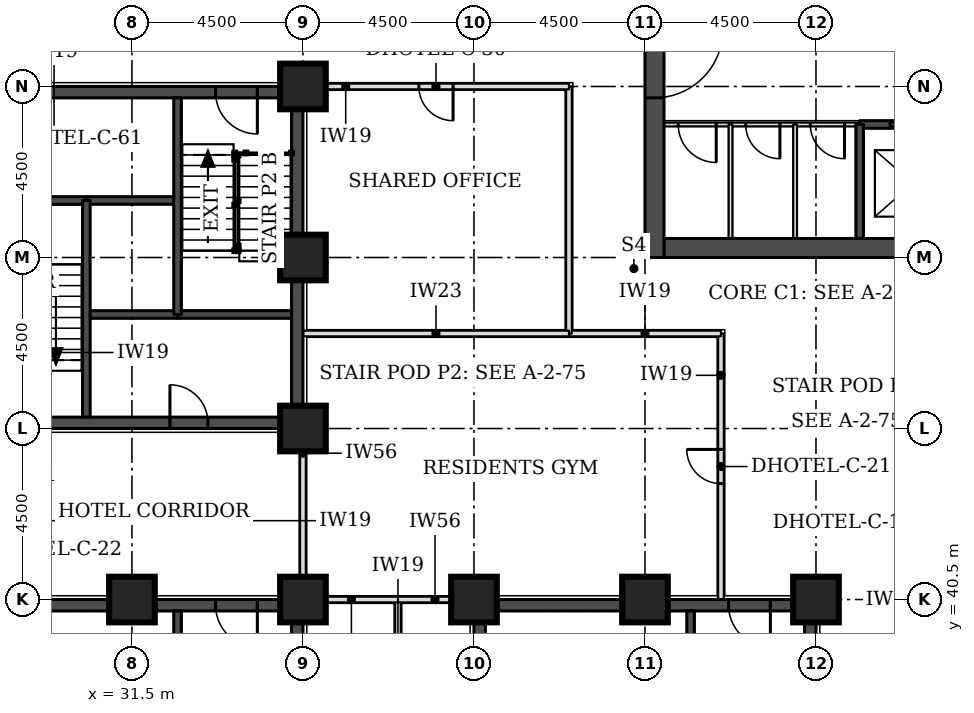
"""IFC4 building model, lengths in metres.
Left out: names, types, materials, properties, quantities, classifications, styles, units other than length and angle.
Written with IfcOpenShell. Run it as: python <this file> out.ifc"""

import sys

from ifc_helpers import new_model, si_unit, direction, frame, frame_2d, origin, origin_2d, place, context, subcontext, project, spatial, rectangle, extrude, element, fill, save


model = new_model("IFC4")
c1 = context("Model", 3, precision=1e-05, world=origin(), true_north=direction((0.0, 1.0)))
c2 = subcontext(c1, "Body", "Model", "MODEL_VIEW")
j1 = project(units=[si_unit("LENGTHUNIT", "METRE"), si_unit("PLANEANGLEUNIT", "RADIAN")], contexts=[c1])
p1 = place(None, origin())
s1 = spatial("IfcSite", under=j1, at=p1, CompositionType="ELEMENT")
p2 = place(p1, origin())
s2 = spatial("IfcBuilding", under=s1, at=p2, CompositionType="ELEMENT")
p3 = place(p2, frame((0.0, 0.0, 33.0)))
s3 = spatial("IfcBuildingStorey", under=s2, at=p3, CompositionType="ELEMENT", Elevation=33.0)
for number, where, z_axis, x_axis in (
    (1, (31.5, 40.5, 0.0), (0.0, 0.0, 1.0), (1.0, 0.0, 0.0)),
    (2, (36.0, 40.5, 0.0), (0.0, 0.0, 1.0), (1.0, 0.0, 0.0)),
    (3, (40.5, 40.5, 0.0), (0.0, 0.0, 1.0), (1.0, 0.0, 0.0)),
    (4, (45.0, 40.5, 0.0), (0.0, 0.0, 1.0), (1.0, 0.0, 0.0)),
    (5, (49.5, 40.5, 0.0), (0.0, 0.0, 1.0), (1.0, 0.0, 0.0)),
    (6, (36.0, 45.0, 0.0), (0.0, 0.0, 1.0), (1.0, 0.0, 0.0)),
    (7, (36.0, 49.5, 0.0), (0.0, 0.0, 1.0), (1.0, 0.0, 0.0)),
    (8, (36.0, 54.0, 0.0), (0.0, 0.0, 1.0), (1.0, 0.0, 0.0)),
):
    element("IfcColumn", number, at=place(p3, frame(where, z_axis=z_axis, x_axis=x_axis)), inside=s3, PredefinedType="COLUMN", context=c2, shape_type="SweptSolid", body=[
        extrude(rectangle(XDim=1.2, YDim=1.2, at=origin_2d()), origin(), (0.0, 0.0, 1.0), 3.3),
    ])
p4 = place(p3, frame((45.5, 49.75, 0.0), z_axis=(0.0, 0.0, 1.0), x_axis=(1.0, 0.0, 0.0)))
e9 = element("IfcWall", 9, at=p4, inside=s3, PredefinedType="SHEAR", context=c2, shape_type="SweptSolid", body=[
    extrude(rectangle(XDim=21.5, YDim=0.5, at=frame_2d((10.75, 0.0))), origin(), (0.0, 0.0, 1.0), 3.3),
])
p5 = place(p3, frame((45.25, 49.5, 0.0), z_axis=(0.0, 0.0, 1.0), x_axis=(0.0, 1.0, 0.0)))
e10 = element("IfcWall", 10, at=p5, inside=s3, PredefinedType="SHEAR", context=c2, shape_type="SweptSolid", body=[
    extrude(rectangle(XDim=22.5, YDim=0.5, at=frame_2d((11.25, 0.0))), origin(), (0.0, 0.0, 1.0), 3.3),
])
p6 = place(p5, frame((4.2, 0.0, 0.0)))
e11 = element("IfcOpeningElement", 11, at=p6, cuts=e10, PredefinedType="OPENING", context=c2, shape_type="SweptSolid", body=[
    extrude(rectangle(XDim=1.8, YDim=2.1, at=frame_2d((0.9, 1.05))), frame((0.0, 0.26, 0.0), z_axis=(0.0, -1.0, 0.0), x_axis=(1.0, 0.0, 0.0)), (0.0, 0.0, 1.0), 0.52),
])
p7 = place(p5, frame((6.9, 0.0, 0.0)))
e12 = element("IfcOpeningElement", 12, at=p7, cuts=e10, PredefinedType="OPENING", context=c2, shape_type="SweptSolid", body=[
    extrude(rectangle(XDim=1.1, YDim=2.1, at=frame_2d((0.55, 1.05))), frame((0.0, 0.26, 0.0), z_axis=(0.0, -1.0, 0.0), x_axis=(1.0, 0.0, 0.0)), (0.0, 0.0, 1.0), 0.52),
])
p8 = place(p5, frame((13.6, 0.0, 0.0)))
e13 = element("IfcOpeningElement", 13, at=p8, cuts=e10, PredefinedType="OPENING", context=c2, shape_type="SweptSolid", body=[
    extrude(rectangle(XDim=1.1, YDim=2.1, at=frame_2d((0.55, 1.05))), frame((0.0, 0.26, 0.0), z_axis=(0.0, -1.0, 0.0), x_axis=(1.0, 0.0, 0.0)), (0.0, 0.0, 1.0), 0.52),
])
p9 = place(p5, frame((16.5, 0.0, 0.0)))
e14 = element("IfcOpeningElement", 14, at=p9, cuts=e10, PredefinedType="OPENING", context=c2, shape_type="SweptSolid", body=[
    extrude(rectangle(XDim=1.8, YDim=2.1, at=frame_2d((0.9, 1.05))), frame((0.0, 0.26, 0.0), z_axis=(0.0, -1.0, 0.0), x_axis=(1.0, 0.0, 0.0)), (0.0, 0.0, 1.0), 0.52),
])
p10 = place(p3, frame((27.3, 45.15, 0.0), z_axis=(0.0, 0.0, 1.0), x_axis=(1.0, 0.0, 0.0)))
e15 = element("IfcWall", 15, at=p10, inside=s3, PredefinedType="SHEAR", context=c2, shape_type="SweptSolid", body=[
    extrude(rectangle(XDim=8.4, YDim=0.3, at=frame_2d((4.2, 0.0))), origin(), (0.0, 0.0, 1.0), 3.3),
])
p11 = place(p10, frame((5.2, 0.0, 0.0)))
e16 = element("IfcOpeningElement", 16, at=p11, cuts=e15, PredefinedType="OPENING", context=c2, shape_type="SweptSolid", body=[
    extrude(rectangle(XDim=1.0, YDim=2.1, at=frame_2d((0.5, 1.05))), frame((0.0, 0.16, 0.0), z_axis=(0.0, -1.0, 0.0), x_axis=(1.0, 0.0, 0.0)), (0.0, 0.0, 1.0), 0.32),
])
p12 = place(p3, frame((27.3, 53.85, 0.0), z_axis=(0.0, 0.0, 1.0), x_axis=(1.0, 0.0, 0.0)))
e17 = element("IfcWall", 17, at=p12, inside=s3, PredefinedType="SHEAR", context=c2, shape_type="SweptSolid", body=[
    extrude(rectangle(XDim=8.4, YDim=0.3, at=frame_2d((4.2, 0.0))), origin(), (0.0, 0.0, 1.0), 3.3),
])
p13 = place(p12, frame((6.4, 0.0, 0.0)))
e18 = element("IfcOpeningElement", 18, at=p13, cuts=e17, PredefinedType="OPENING", context=c2, shape_type="SweptSolid", body=[
    extrude(rectangle(XDim=1.1, YDim=2.1, at=frame_2d((0.55, 1.05))), frame((0.0, 0.16, 0.0), z_axis=(0.0, -1.0, 0.0), x_axis=(1.0, 0.0, 0.0)), (0.0, 0.0, 1.0), 0.32),
])
p14 = place(p3, frame((35.85, 45.0, 0.0), z_axis=(0.0, 0.0, 1.0), x_axis=(0.0, 1.0, 0.0)))
e19 = element("IfcWall", 19, at=p14, inside=s3, PredefinedType="SHEAR", context=c2, shape_type="SweptSolid", body=[
    extrude(rectangle(XDim=9.0, YDim=0.3, at=frame_2d((4.5, 0.0))), origin(), (0.0, 0.0, 1.0), 3.3),
])
p15 = place(p3, frame((40.8, 40.35, 0.0), z_axis=(0.0, 0.0, 1.0), x_axis=(1.0, 0.0, 0.0)))
e20 = element("IfcWall", 20, at=p15, inside=s3, PredefinedType="SHEAR", context=c2, shape_type="SweptSolid", body=[
    extrude(rectangle(XDim=8.4, YDim=0.3, at=frame_2d((4.2, 0.0))), origin(), (0.0, 0.0, 1.0), 3.3),
])
p16 = place(p15, frame((6.4, 0.0, 0.0)))
e21 = element("IfcOpeningElement", 21, at=p16, cuts=e20, PredefinedType="OPENING", context=c2, shape_type="SweptSolid", body=[
    extrude(rectangle(XDim=1.1, YDim=2.1, at=frame_2d((0.55, 1.05))), frame((0.0, 0.16, 0.0), z_axis=(0.0, -1.0, 0.0), x_axis=(1.0, 0.0, 0.0)), (0.0, 0.0, 1.0), 0.32),
])
p17 = place(p3, frame((40.65, 31.5, 0.0), z_axis=(0.0, 0.0, 1.0), x_axis=(0.0, 1.0, 0.0)))
e22 = element("IfcWall", 22, at=p17, inside=s3, PredefinedType="SHEAR", context=c2, shape_type="SweptSolid", body=[
    extrude(rectangle(XDim=9.0, YDim=0.3, at=frame_2d((4.5, 0.0))), origin(), (0.0, 0.0, 1.0), 3.3),
])
p18 = place(p17, frame((0.4, 0.0, 0.0)))
e23 = element("IfcOpeningElement", 23, at=p18, cuts=e22, PredefinedType="OPENING", context=c2, shape_type="SweptSolid", body=[
    extrude(rectangle(XDim=1.1, YDim=2.1, at=frame_2d((0.55, 1.05))), frame((0.0, 0.16, 0.0), z_axis=(0.0, -1.0, 0.0), x_axis=(1.0, 0.0, 0.0)), (0.0, 0.0, 1.0), 0.32),
])
p19 = place(p3, frame((49.35, 31.5, 0.0), z_axis=(0.0, 0.0, 1.0), x_axis=(0.0, 1.0, 0.0)))
e24 = element("IfcWall", 24, at=p19, inside=s3, PredefinedType="SHEAR", context=c2, shape_type="SweptSolid", body=[
    extrude(rectangle(XDim=9.0, YDim=0.3, at=frame_2d((4.5, 0.0))), origin(), (0.0, 0.0, 1.0), 3.3),
])
p20 = place(p3, frame((27.3, 40.35, 0.0), z_axis=(0.0, 0.0, 1.0), x_axis=(1.0, 0.0, 0.0)))
e25 = element("IfcWall", 25, at=p20, inside=s3, PredefinedType="SHEAR", context=c2, shape_type="SweptSolid", body=[
    extrude(rectangle(XDim=8.4, YDim=0.3, at=frame_2d((4.2, 0.0))), origin(), (0.0, 0.0, 1.0), 3.3),
])
p21 = place(p20, frame((6.4, 0.0, 0.0)))
e26 = element("IfcOpeningElement", 26, at=p21, cuts=e25, PredefinedType="OPENING", context=c2, shape_type="SweptSolid", body=[
    extrude(rectangle(XDim=1.1, YDim=2.1, at=frame_2d((0.55, 1.05))), frame((0.0, 0.16, 0.0), z_axis=(0.0, -1.0, 0.0), x_axis=(1.0, 0.0, 0.0)), (0.0, 0.0, 1.0), 0.32),
])
p22 = place(p3, frame((35.85, 31.5, 0.0), z_axis=(0.0, 0.0, 1.0), x_axis=(0.0, 1.0, 0.0)))
e27 = element("IfcWall", 27, at=p22, inside=s3, PredefinedType="SHEAR", context=c2, shape_type="SweptSolid", body=[
    extrude(rectangle(XDim=9.0, YDim=0.3, at=frame_2d((4.5, 0.0))), origin(), (0.0, 0.0, 1.0), 3.3),
])
p23 = place(p3, frame((38.5, 27.15, 0.0), z_axis=(0.0, 0.0, 1.0), x_axis=(0.0, 1.0, 0.0)))
e28 = element("IfcWall", 28, at=p23, inside=s3, PredefinedType="PARTITIONING", context=c2, shape_type="SweptSolid", body=[
    extrude(rectangle(XDim=13.35, YDim=0.15, at=frame_2d((6.675, 0.0))), origin(), (0.0, 0.0, 1.0), 3.08),
])
p24 = place(p23, frame((6.225, 0.0, 0.0)))
e29 = element("IfcOpeningElement", 29, at=p24, cuts=e28, PredefinedType="OPENING", context=c2, shape_type="SweptSolid", body=[
    extrude(rectangle(XDim=0.9, YDim=2.1, at=frame_2d((0.45, 1.05))), frame((0.0, 0.085, 0.0), z_axis=(0.0, -1.0, 0.0), x_axis=(1.0, 0.0, 0.0)), (0.0, 0.0, 1.0), 0.17),
])
p25 = place(p3, frame((38.5, 40.5, 0.0), z_axis=(0.0, 0.0, 1.0), x_axis=(1.0, 0.0, 0.0)))
e30 = element("IfcWall", 30, at=p25, inside=s3, PredefinedType="PARTITIONING", context=c2, shape_type="SweptSolid", body=[
    extrude(rectangle(XDim=1.95, YDim=0.15, at=frame_2d((0.975, 0.0))), origin(), (0.0, 0.0, 1.0), 2.33),
])
p26 = place(p3, frame((36.0, 40.55, 0.0), z_axis=(0.0, 0.0, 1.0), x_axis=(0.0, 1.0, 0.0)))
e31 = element("IfcWall", 31, at=p26, inside=s3, PredefinedType="PARTITIONING", context=c2, shape_type="SweptSolid", body=[
    extrude(rectangle(XDim=4.4, YDim=0.15, at=frame_2d((2.2, 0.0))), origin(), (0.0, 0.0, 1.0), 2.33),
])
p27 = place(p3, frame((47.0, 40.5, 0.0), z_axis=(0.0, 0.0, 1.0), x_axis=(0.0, 1.0, 0.0)))
e32 = element("IfcWall", 32, at=p27, inside=s3, PredefinedType="PARTITIONING", context=c2, shape_type="SweptSolid", body=[
    extrude(rectangle(XDim=7.0, YDim=0.15, at=frame_2d((3.5, 0.0))), origin(), (0.0, 0.0, 1.0), 3.08),
])
p28 = place(p27, frame((3.05, 0.0, 0.0)))
e33 = element("IfcOpeningElement", 33, at=p28, cuts=e32, PredefinedType="OPENING", context=c2, shape_type="SweptSolid", body=[
    extrude(rectangle(XDim=0.9, YDim=2.1, at=frame_2d((0.45, 1.05))), frame((0.0, 0.085, 0.0), z_axis=(0.0, -1.0, 0.0), x_axis=(1.0, 0.0, 0.0)), (0.0, 0.0, 1.0), 0.17),
])
p29 = place(p3, frame((43.0, 47.5, 0.0), z_axis=(0.0, 0.0, 1.0), x_axis=(1.0, 0.0, 0.0)))
e34 = element("IfcWall", 34, at=p29, inside=s3, PredefinedType="PARTITIONING", context=c2, shape_type="SweptSolid", body=[
    extrude(rectangle(XDim=4.0, YDim=0.15, at=frame_2d((2.0, 0.0))), origin(), (0.0, 0.0, 1.0), 3.08),
])
p30 = place(p3, frame((43.0, 47.5, 0.0), z_axis=(0.0, 0.0, 1.0), x_axis=(0.0, 1.0, 0.0)))
e35 = element("IfcWall", 35, at=p30, inside=s3, PredefinedType="PARTITIONING", context=c2, shape_type="SweptSolid", body=[
    extrude(rectangle(XDim=6.5, YDim=0.15, at=frame_2d((3.25, 0.0))), origin(), (0.0, 0.0, 1.0), 3.08),
])
p31 = place(p3, frame((36.05, 54.0, 0.0), z_axis=(0.0, 0.0, 1.0), x_axis=(1.0, 0.0, 0.0)))
e36 = element("IfcWall", 36, at=p31, inside=s3, PredefinedType="PARTITIONING", context=c2, shape_type="SweptSolid", body=[
    extrude(rectangle(XDim=6.95, YDim=0.15, at=frame_2d((3.475, 0.0))), origin(), (0.0, 0.0, 1.0), 3.08),
])
p32 = place(p31, frame((3.0, 0.0, 0.0)))
e37 = element("IfcOpeningElement", 37, at=p32, cuts=e36, PredefinedType="OPENING", context=c2, shape_type="SweptSolid", body=[
    extrude(rectangle(XDim=0.9, YDim=2.1, at=frame_2d((0.45, 1.05))), frame((0.0, 0.085, 0.0), z_axis=(0.0, -1.0, 0.0), x_axis=(1.0, 0.0, 0.0)), (0.0, 0.0, 1.0), 0.17),
])
p33 = place(p3, frame((36.05, 40.5, 0.0), z_axis=(0.0, 0.0, 1.0), x_axis=(1.0, 0.0, 0.0)))
e38 = element("IfcWall", 38, at=p33, inside=s3, PredefinedType="PARTITIONING", context=c2, shape_type="SweptSolid", body=[
    extrude(rectangle(XDim=2.45, YDim=0.15, at=frame_2d((1.225, 0.0))), origin(), (0.0, 0.0, 1.0), 2.33),
])
p34 = place(p3, frame((36.0, 47.5, 0.0), z_axis=(0.0, 0.0, 1.0), x_axis=(1.0, 0.0, 0.0)))
e39 = element("IfcWall", 39, at=p34, inside=s3, PredefinedType="PARTITIONING", context=c2, shape_type="SweptSolid", body=[
    extrude(rectangle(XDim=7.0, YDim=0.15, at=frame_2d((3.5, 0.0))), origin(), (0.0, 0.0, 1.0), 3.08),
])
p35 = place(p3, frame((45.5, 53.0, 0.0), z_axis=(0.0, 0.0, 1.0), x_axis=(1.0, 0.0, 0.0)))
e40 = element("IfcWall", 40, at=p35, inside=s3, PredefinedType="PARTITIONING", context=c2, shape_type="SweptSolid", body=[
    extrude(rectangle(XDim=5.15, YDim=0.1, at=frame_2d((2.575, 0.0))), origin(), (0.0, 0.0, 1.0), 3.08),
])
p36 = place(p35, frame((0.375, 0.0, 0.0)))
e41 = element("IfcOpeningElement", 41, at=p36, cuts=e40, PredefinedType="OPENING", context=c2, shape_type="SweptSolid", body=[
    extrude(rectangle(XDim=1.0, YDim=2.1, at=frame_2d((0.5, 1.05))), frame((0.0, 0.06, 0.0), z_axis=(0.0, -1.0, 0.0), x_axis=(1.0, 0.0, 0.0)), (0.0, 0.0, 1.0), 0.12),
])
p37 = place(p35, frame((2.151, 0.0, 0.0)))
e42 = element("IfcOpeningElement", 42, at=p37, cuts=e40, PredefinedType="OPENING", context=c2, shape_type="SweptSolid", body=[
    extrude(rectangle(XDim=0.9, YDim=2.1, at=frame_2d((0.45, 1.05))), frame((0.0, 0.06, 0.0), z_axis=(0.0, -1.0, 0.0), x_axis=(1.0, 0.0, 0.0)), (0.0, 0.0, 1.0), 0.12),
])
p38 = place(p35, frame((3.85, 0.0, 0.0)))
e43 = element("IfcOpeningElement", 43, at=p38, cuts=e40, PredefinedType="OPENING", context=c2, shape_type="SweptSolid", body=[
    extrude(rectangle(XDim=0.9, YDim=2.1, at=frame_2d((0.45, 1.05))), frame((0.0, 0.06, 0.0), z_axis=(0.0, -1.0, 0.0), x_axis=(1.0, 0.0, 0.0)), (0.0, 0.0, 1.0), 0.12),
])
p39 = place(p3, frame((50.65, 53.0, 0.0), z_axis=(0.0, 0.0, 1.0), x_axis=(1.0, 0.0, 0.0)))
e44 = element("IfcWall", 44, at=p39, inside=s3, PredefinedType="SOLIDWALL", context=c2, shape_type="SweptSolid", body=[
    extrude(rectangle(XDim=11.2, YDim=0.2, at=frame_2d((5.6, 0.0))), origin(), (0.0, 0.0, 1.0), 3.08),
])
p40 = place(p39, frame((0.8, 0.0, 0.0)))
e45 = element("IfcOpeningElement", 45, at=p40, cuts=e44, PredefinedType="OPENING", context=c2, shape_type="SweptSolid", body=[
    extrude(rectangle(XDim=1.2, YDim=2.1, at=frame_2d((0.6, 1.05))), frame((0.0, 0.11, 0.0), z_axis=(0.0, -1.0, 0.0), x_axis=(1.0, 0.0, 0.0)), (0.0, 0.0, 1.0), 0.22),
])
p41 = place(p39, frame((3.6, 0.0, 0.0)))
e46 = element("IfcOpeningElement", 46, at=p41, cuts=e44, PredefinedType="OPENING", context=c2, shape_type="SweptSolid", body=[
    extrude(rectangle(XDim=1.2, YDim=2.1, at=frame_2d((0.6, 1.05))), frame((0.0, 0.11, 0.0), z_axis=(0.0, -1.0, 0.0), x_axis=(1.0, 0.0, 0.0)), (0.0, 0.0, 1.0), 0.22),
])
p42 = place(p39, frame((6.4, 0.0, 0.0)))
e47 = element("IfcOpeningElement", 47, at=p42, cuts=e44, PredefinedType="OPENING", context=c2, shape_type="SweptSolid", body=[
    extrude(rectangle(XDim=1.2, YDim=2.1, at=frame_2d((0.6, 1.05))), frame((0.0, 0.11, 0.0), z_axis=(0.0, -1.0, 0.0), x_axis=(1.0, 0.0, 0.0)), (0.0, 0.0, 1.0), 0.22),
])
p43 = place(p39, frame((9.2, 0.0, 0.0)))
e48 = element("IfcOpeningElement", 48, at=p43, cuts=e44, PredefinedType="OPENING", context=c2, shape_type="SweptSolid", body=[
    extrude(rectangle(XDim=1.2, YDim=2.1, at=frame_2d((0.6, 1.05))), frame((0.0, 0.11, 0.0), z_axis=(0.0, -1.0, 0.0), x_axis=(1.0, 0.0, 0.0)), (0.0, 0.0, 1.0), 0.22),
])
for number, where, z_axis, x_axis in (
    (49, (47.251, 50.0, 0.0), (0.0, 0.0, 1.0), (0.0, 1.0, 0.0)),
    (50, (48.95, 50.0, 0.0), (0.0, 0.0, 1.0), (0.0, 1.0, 0.0)),
):
    element("IfcWall", number, at=place(p3, frame(where, z_axis=z_axis, x_axis=x_axis)), inside=s3, PredefinedType="PARTITIONING", context=c2, shape_type="SweptSolid", body=[
        extrude(rectangle(XDim=3.0, YDim=0.1, at=frame_2d((1.5, 0.0))), origin(), (0.0, 0.0, 1.0), 3.08),
    ])
p44 = place(p3, frame((50.65, 50.0, 0.0), z_axis=(0.0, 0.0, 1.0), x_axis=(0.0, 1.0, 0.0)))
e51 = element("IfcWall", 51, at=p44, inside=s3, PredefinedType="SOLIDWALL", context=c2, shape_type="SweptSolid", body=[
    extrude(rectangle(XDim=3.0, YDim=0.2, at=frame_2d((1.5, 0.0))), origin(), (0.0, 0.0, 1.0), 3.08),
])
p45 = place(p3, frame((30.3, 48.0, 0.0), z_axis=(0.0, 0.0, 1.0), x_axis=(1.0, 0.0, 0.0)))
e52 = element("IfcWall", 52, at=p45, inside=s3, PredefinedType="SOLIDWALL", context=c2, shape_type="SweptSolid", body=[
    extrude(rectangle(XDim=2.4, YDim=0.2, at=frame_2d((1.2, 0.0))), origin(), (0.0, 0.0, 1.0), 3.08),
])
p46 = place(p3, frame((32.7, 48.0, 0.0), z_axis=(0.0, 0.0, 1.0), x_axis=(1.0, 0.0, 0.0)))
e53 = element("IfcWall", 53, at=p46, inside=s3, PredefinedType="SOLIDWALL", context=c2, shape_type="SweptSolid", body=[
    extrude(rectangle(XDim=3.0, YDim=0.2, at=frame_2d((1.5, 0.0))), origin(), (0.0, 0.0, 1.0), 3.08),
])
p47 = place(p3, frame((30.3, 51.0, 0.0), z_axis=(0.0, 0.0, 1.0), x_axis=(1.0, 0.0, 0.0)))
e54 = element("IfcWall", 54, at=p47, inside=s3, PredefinedType="SOLIDWALL", context=c2, shape_type="SweptSolid", body=[
    extrude(rectangle(XDim=2.4, YDim=0.2, at=frame_2d((1.2, 0.0))), origin(), (0.0, 0.0, 1.0), 3.3),
])
p48 = place(p3, frame((27.3, 51.0, 0.0), z_axis=(0.0, 0.0, 1.0), x_axis=(1.0, 0.0, 0.0)))
e55 = element("IfcWall", 55, at=p48, inside=s3, PredefinedType="SOLIDWALL", context=c2, shape_type="SweptSolid", body=[
    extrude(rectangle(XDim=3.0, YDim=0.2, at=frame_2d((1.5, 0.0))), origin(), (0.0, 0.0, 1.0), 3.08),
])
for number, where, z_axis, x_axis in (
    (56, (30.3, 45.3, 0.0), (0.0, 0.0, 1.0), (0.0, 1.0, 0.0)),
    (57, (32.7, 48.0, 0.0), (0.0, 0.0, 1.0), (0.0, 1.0, 0.0)),
    (58, (46.2, 34.5, 0.0), (0.0, 0.0, 1.0), (0.0, 1.0, 0.0)),
    (59, (32.7, 34.5, 0.0), (0.0, 0.0, 1.0), (0.0, 1.0, 0.0)),
):
    element("IfcWall", number, at=place(p3, frame(where, z_axis=z_axis, x_axis=x_axis)), inside=s3, PredefinedType="SOLIDWALL", context=c2, shape_type="SweptSolid", body=[
        extrude(rectangle(XDim=5.7, YDim=0.2, at=frame_2d((2.85, 0.0))), origin(), (0.0, 0.0, 1.0), 3.08),
    ])
p49 = place(p32, frame((0.9, 0.0, 0.0), z_axis=(0.0, 0.0, 1.0), x_axis=(-1.0, 0.0, 0.0)))
e60 = element("IfcDoor", 60, at=p49, inside=s3, OperationType="SINGLE_SWING_LEFT", PredefinedType="DOOR", context=c2, shape_type="SweptSolid", body=[
    extrude(rectangle(XDim=0.9, YDim=2.1, at=frame_2d((0.45, 1.05))), frame((0.0, 0.025, 0.0), z_axis=(0.0, -1.0, 0.0), x_axis=(1.0, 0.0, 0.0)), (0.0, 0.0, 1.0), 0.05),
])
fill(e37, e60)
p50 = place(p28, origin())
e61 = element("IfcDoor", 61, at=p50, inside=s3, OperationType="SINGLE_SWING_RIGHT", PredefinedType="DOOR", context=c2, shape_type="SweptSolid", body=[
    extrude(rectangle(XDim=0.9, YDim=2.1, at=frame_2d((0.45, 1.05))), frame((0.0, 0.025, 0.0), z_axis=(0.0, -1.0, 0.0), x_axis=(1.0, 0.0, 0.0)), (0.0, 0.0, 1.0), 0.05),
])
fill(e33, e61)
p51 = place(p40, origin())
e62 = element("IfcDoor", 62, at=p51, inside=s3, OperationType="DOUBLE_DOOR_SLIDING", PredefinedType="DOOR", context=c2, shape_type="SweptSolid", body=[
    extrude(rectangle(XDim=1.2, YDim=2.1, at=frame_2d((0.6, 1.05))), frame((0.0, 0.025, 0.0), z_axis=(0.0, -1.0, 0.0), x_axis=(1.0, 0.0, 0.0)), (0.0, 0.0, 1.0), 0.05),
])
fill(e45, e62)
p52 = place(p6, frame((1.8, 0.0, 0.0), z_axis=(0.0, 0.0, 1.0), x_axis=(-1.0, 0.0, 0.0)))
e63 = element("IfcDoor", 63, at=p52, inside=s3, OperationType="SINGLE_SWING_LEFT", PredefinedType="DOOR", context=c2, shape_type="SweptSolid", body=[
    extrude(rectangle(XDim=1.8, YDim=2.1, at=frame_2d((0.9, 1.05))), frame((0.0, 0.025, 0.0), z_axis=(0.0, -1.0, 0.0), x_axis=(1.0, 0.0, 0.0)), (0.0, 0.0, 1.0), 0.05),
])
fill(e11, e63)
p53 = place(p36, frame((1.0, 0.0, 0.0), z_axis=(0.0, 0.0, 1.0), x_axis=(-1.0, 0.0, 0.0)))
e64 = element("IfcDoor", 64, at=p53, inside=s3, OperationType="SINGLE_SWING_LEFT", PredefinedType="DOOR", context=c2, shape_type="SweptSolid", body=[
    extrude(rectangle(XDim=1.0, YDim=2.1, at=frame_2d((0.5, 1.05))), frame((0.0, 0.025, 0.0), z_axis=(0.0, -1.0, 0.0), x_axis=(1.0, 0.0, 0.0)), (0.0, 0.0, 1.0), 0.05),
])
fill(e41, e64)
p54 = place(p37, frame((0.9, 0.0, 0.0), z_axis=(0.0, 0.0, 1.0), x_axis=(-1.0, 0.0, 0.0)))
e65 = element("IfcDoor", 65, at=p54, inside=s3, OperationType="SINGLE_SWING_LEFT", PredefinedType="DOOR", context=c2, shape_type="SweptSolid", body=[
    extrude(rectangle(XDim=0.9, YDim=2.1, at=frame_2d((0.45, 1.05))), frame((0.0, 0.025, 0.0), z_axis=(0.0, -1.0, 0.0), x_axis=(1.0, 0.0, 0.0)), (0.0, 0.0, 1.0), 0.05),
])
fill(e42, e65)
p55 = place(p38, frame((0.9, 0.0, 0.0), z_axis=(0.0, 0.0, 1.0), x_axis=(-1.0, 0.0, 0.0)))
e66 = element("IfcDoor", 66, at=p55, inside=s3, OperationType="SINGLE_SWING_LEFT", PredefinedType="DOOR", context=c2, shape_type="SweptSolid", body=[
    extrude(rectangle(XDim=0.9, YDim=2.1, at=frame_2d((0.45, 1.05))), frame((0.0, 0.025, 0.0), z_axis=(0.0, -1.0, 0.0), x_axis=(1.0, 0.0, 0.0)), (0.0, 0.0, 1.0), 0.05),
])
fill(e43, e66)
p56 = place(p13, frame((1.1, 0.0, 0.0), z_axis=(0.0, 0.0, 1.0), x_axis=(-1.0, 0.0, 0.0)))
e67 = element("IfcDoor", 67, at=p56, inside=s3, OperationType="SINGLE_SWING_LEFT", PredefinedType="DOOR", context=c2, shape_type="SweptSolid", body=[
    extrude(rectangle(XDim=1.1, YDim=2.1, at=frame_2d((0.55, 1.05))), frame((0.0, 0.025, 0.0), z_axis=(0.0, -1.0, 0.0), x_axis=(1.0, 0.0, 0.0)), (0.0, 0.0, 1.0), 0.05),
])
fill(e18, e67)
p57 = place(p11, origin())
e68 = element("IfcDoor", 68, at=p57, inside=s3, OperationType="SINGLE_SWING_LEFT", PredefinedType="DOOR", context=c2, shape_type="SweptSolid", body=[
    extrude(rectangle(XDim=1.0, YDim=2.1, at=frame_2d((0.5, 1.05))), frame((0.0, 0.025, 0.0), z_axis=(0.0, -1.0, 0.0), x_axis=(1.0, 0.0, 0.0)), (0.0, 0.0, 1.0), 0.05),
])
fill(e16, e68)
p58 = place(p16, frame((1.1, 0.0, 0.0), z_axis=(0.0, 0.0, 1.0), x_axis=(-1.0, 0.0, 0.0)))
e69 = element("IfcDoor", 69, at=p58, inside=s3, OperationType="SINGLE_SWING_LEFT", PredefinedType="DOOR", context=c2, shape_type="SweptSolid", body=[
    extrude(rectangle(XDim=1.1, YDim=2.1, at=frame_2d((0.55, 1.05))), frame((0.0, 0.025, 0.0), z_axis=(0.0, -1.0, 0.0), x_axis=(1.0, 0.0, 0.0)), (0.0, 0.0, 1.0), 0.05),
])
fill(e21, e69)
p59 = place(p21, frame((1.1, 0.0, 0.0), z_axis=(0.0, 0.0, 1.0), x_axis=(-1.0, 0.0, 0.0)))
e70 = element("IfcDoor", 70, at=p59, inside=s3, OperationType="SINGLE_SWING_LEFT", PredefinedType="DOOR", context=c2, shape_type="SweptSolid", body=[
    extrude(rectangle(XDim=1.1, YDim=2.1, at=frame_2d((0.55, 1.05))), frame((0.0, 0.025, 0.0), z_axis=(0.0, -1.0, 0.0), x_axis=(1.0, 0.0, 0.0)), (0.0, 0.0, 1.0), 0.05),
])
fill(e26, e70)
save(model, sys.argv[1])
